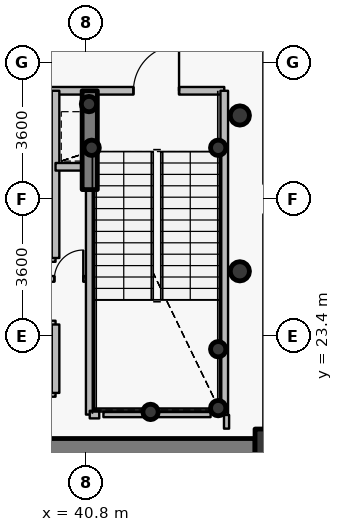
"""IFC4 building model, lengths in metres.
Left out: names, types, materials, properties, quantities, classifications, styles, units other than length and angle.
Written with IfcOpenShell. Run it as: python <this file> out.ifc"""

import sys

from ifc_helpers import new_model, si_unit, direction, frame, frame_2d, origin, origin_2d, place, context, subcontext, project, spatial, rectangle, hollow_circle, extrude, source, transform, mapped, element, fill, save


model = new_model("IFC4")
c1 = context("Model", 3, precision=1e-05, world=origin(), true_north=direction((0.0, 1.0)))
c2 = subcontext(c1, "Body", "Model", "MODEL_VIEW")
j1 = project(units=[si_unit("LENGTHUNIT", "METRE"), si_unit("PLANEANGLEUNIT", "RADIAN")], contexts=[c1])
p1 = place(None, origin())
s1 = spatial("IfcSite", under=j1, at=p1, CompositionType="ELEMENT")
p2 = place(p1, origin())
s2 = spatial("IfcBuilding", under=s1, at=p2, CompositionType="ELEMENT")
p3 = place(p2, frame((0.0, 0.0, 66.0)))
s3 = spatial("IfcBuildingStorey", under=s2, at=p3, CompositionType="ELEMENT", Elevation=66.0)
p4 = place(p3, frame((45.95, 20.25, 0.0), z_axis=(0.0, 0.0, 1.0), x_axis=(1.0, 0.0, 0.0)))
e1 = element("IfcColumn", 1, at=p4, inside=s3, PredefinedType="COLUMN", context=c2, shape_type="SweptSolid", body=[
    extrude(rectangle(XDim=1.4, YDim=1.4, at=origin_2d()), origin(), (0.0, 0.0, 1.0), 4.2),
])
for number, where, z_axis, x_axis in (
    (2, (44.28, 21.5, 0.0), (0.0, 0.0, 1.0), (1.0, 0.0, 0.0)),
    (3, (44.28, 23.05, 0.0), (0.0, 0.0, 1.0), (1.0, 0.0, 0.0)),
    (4, (42.5, 21.4, 0.0), (0.0, 0.0, 1.0), (1.0, 0.0, 0.0)),
    (5, (40.95, 28.35, 0.0), (0.0, 0.0, 1.0), (1.0, 0.0, 0.0)),
    (6, (44.28, 28.35, 0.0), (0.0, 0.0, 1.0), (1.0, 0.0, 0.0)),
    (7, (40.88, 29.5, 0.0), (0.0, 0.0, 1.0), (1.0, 0.0, 0.0)),
):
    element("IfcColumn", number, at=place(p3, frame(where, z_axis=z_axis, x_axis=x_axis)), inside=s3, PredefinedType="COLUMN", context=c2, shape_type="SweptSolid", body=[
        extrude(hollow_circle(Radius=0.203, WallThickness=0.016, at=origin_2d()), origin(), (0.0, 0.0, 1.0), 4.2),
    ])
p5 = place(p3, frame((45.25, 20.25, 0.0), z_axis=(0.0, 0.0, 1.0), x_axis=(-1.0, 0.0, 0.0)))
e8 = element("IfcWall", 8, at=p5, inside=s3, PredefinedType="SHEAR", context=c2, shape_type="SweptSolid", body=[
    extrude(rectangle(XDim=18.5, YDim=0.9, at=frame_2d((9.25, 0.0))), origin(), (0.0, 0.0, 1.0), 3.4),
])
p6 = place(p5, frame((10.0, 0.0, 0.0)))
e9 = element("IfcOpeningElement", 9, at=p6, cuts=e8, PredefinedType="OPENING", context=c2, shape_type="SweptSolid", body=[
    extrude(rectangle(XDim=1.15, YDim=2.15, at=origin_2d()), frame((0.575, 0.46, 1.075), z_axis=(0.0, -1.0, 0.0), x_axis=(1.0, 0.0, 0.0)), (0.0, 0.0, 1.0), 0.92),
])
p7 = place(p3, frame((40.9, 27.25, 0.0), z_axis=(0.0, 0.0, 1.0), x_axis=(0.0, 1.0, 0.0)))
e10 = element("IfcWall", 10, at=p7, inside=s3, PredefinedType="SHEAR", context=c2, shape_type="SweptSolid", body=[
    extrude(rectangle(XDim=2.6, YDim=0.4, at=frame_2d((1.3, 0.0))), origin(), (0.0, 0.0, 1.0), 3.55),
])
for number, where, z_axis, x_axis in (
    (11, (44.85, 25.1, 0.0), (0.0, 0.0, 1.0), (1.0, 0.0, 0.0)),
    (12, (44.85, 29.2, 0.0), (0.0, 0.0, 1.0), (1.0, 0.0, 0.0)),
):
    element("IfcColumn", number, at=place(p3, frame(where, z_axis=z_axis, x_axis=x_axis)), inside=s3, PredefinedType="COLUMN", context=c2, shape_type="SweptSolid", body=[
        extrude(hollow_circle(Radius=0.254, WallThickness=0.02, at=origin_2d()), origin(), (0.0, 0.0, 1.0), 4.2),
    ])
p8 = place(p3, frame((35.05, 27.25, 0.0), z_axis=(0.0, 0.0, 1.0), x_axis=(1.0, 0.0, 0.0)))
e13 = element("IfcWall", 13, at=p8, inside=s3, PredefinedType="PARTITIONING", context=c2, shape_type="SweptSolid", body=[
    extrude(rectangle(XDim=4.95, YDim=0.2, at=frame_2d((2.475, 0.0))), origin(), (0.0, 0.0, 1.0), 3.535),
])
p9 = place(p3, frame((35.45, 23.7, 0.0), z_axis=(0.0, 0.0, 1.0), x_axis=(1.0, 0.0, 0.0)))
e14 = element("IfcWall", 14, at=p9, inside=s3, PredefinedType="PARTITIONING", context=c2, shape_type="SweptSolid", body=[
    extrude(rectangle(XDim=4.55, YDim=0.2, at=frame_2d((2.275, 0.0))), origin(), (0.0, 0.0, 1.0), 3.535),
])
p10 = place(p9, frame((0.25, 0.0, 0.0)))
e15 = element("IfcOpeningElement", 15, at=p10, cuts=e14, PredefinedType="OPENING", context=c2, shape_type="SweptSolid", body=[
    extrude(rectangle(XDim=1.05, YDim=2.15, at=origin_2d()), frame((0.525, 0.11, 1.075), z_axis=(0.0, -1.0, 0.0), x_axis=(1.0, 0.0, 0.0)), (0.0, 0.0, 1.0), 0.22),
])
p11 = place(p9, frame((1.745, 0.0, 0.0)))
e16 = element("IfcOpeningElement", 16, at=p11, cuts=e14, PredefinedType="OPENING", context=c2, shape_type="SweptSolid", body=[
    extrude(rectangle(XDim=1.05, YDim=2.15, at=origin_2d()), frame((0.525, 0.11, 1.075), z_axis=(0.0, -1.0, 0.0), x_axis=(1.0, 0.0, 0.0)), (0.0, 0.0, 1.0), 0.22),
])
p12 = place(p9, frame((3.165, 0.0, 0.0)))
e17 = element("IfcOpeningElement", 17, at=p12, cuts=e14, PredefinedType="OPENING", context=c2, shape_type="SweptSolid", body=[
    extrude(rectangle(XDim=1.05, YDim=2.15, at=origin_2d()), frame((0.525, 0.11, 1.075), z_axis=(0.0, -1.0, 0.0), x_axis=(1.0, 0.0, 0.0)), (0.0, 0.0, 1.0), 0.22),
])
p13 = place(p3, frame((35.45, 25.45, 0.0), z_axis=(0.0, 0.0, 1.0), x_axis=(1.0, 0.0, 0.0)))
e18 = element("IfcWall", 18, at=p13, inside=s3, PredefinedType="PARTITIONING", context=c2, shape_type="SweptSolid", body=[
    extrude(rectangle(XDim=4.55, YDim=0.2, at=frame_2d((2.275, 0.0))), origin(), (0.0, 0.0, 1.0), 3.535),
])
p14 = place(p3, frame((35.95, 29.85, 0.0), z_axis=(0.0, 0.0, 1.0), x_axis=(1.0, 0.0, 0.0)))
e19 = element("IfcWall", 19, at=p14, inside=s3, PredefinedType="PARTITIONING", context=c2, shape_type="SweptSolid", body=[
    extrude(rectangle(XDim=8.49, YDim=0.2, at=frame_2d((4.245, 0.0))), origin(), (0.0, 0.0, 1.0), 3.535),
])
p15 = place(p14, frame((6.1, 0.0, 0.0)))
e20 = element("IfcOpeningElement", 20, at=p15, cuts=e19, PredefinedType="OPENING", context=c2, shape_type="SweptSolid", body=[
    extrude(rectangle(XDim=1.2, YDim=2.15, at=origin_2d()), frame((0.6, 0.11, 1.075), z_axis=(0.0, -1.0, 0.0), x_axis=(1.0, 0.0, 0.0)), (0.0, 0.0, 1.0), 0.22),
])
p16 = place(p14, frame((0.37, 0.0, 0.0)))
e21 = element("IfcOpeningElement", 21, at=p16, cuts=e19, PredefinedType="OPENING", context=c2, shape_type="SweptSolid", body=[
    extrude(rectangle(XDim=1.15, YDim=2.15, at=origin_2d()), frame((0.575, 0.11, 1.075), z_axis=(0.0, -1.0, 0.0), x_axis=(1.0, 0.0, 0.0)), (0.0, 0.0, 1.0), 0.22),
])
p17 = place(p14, frame((2.425, 0.0, 0.0)))
e22 = element("IfcOpeningElement", 22, at=p17, cuts=e19, PredefinedType="OPENING", context=c2, shape_type="SweptSolid", body=[
    extrude(rectangle(XDim=1.05, YDim=2.15, at=origin_2d()), frame((0.525, 0.11, 1.075), z_axis=(0.0, -1.0, 0.0), x_axis=(1.0, 0.0, 0.0)), (0.0, 0.0, 1.0), 0.22),
])
p18 = place(p3, frame((39.8, 21.9, 0.0), z_axis=(0.0, 0.0, 1.0), x_axis=(1.0, 0.0, 0.0)))
e23 = element("IfcWall", 23, at=p18, inside=s3, PredefinedType="PARTITIONING", context=c2, shape_type="SweptSolid", body=[
    extrude(rectangle(XDim=0.2, YDim=0.2, at=frame_2d((0.1, 0.0))), origin(), (0.0, 0.0, 1.0), 3.95),
])
p19 = place(p3, frame((39.8, 24.9, 0.0), z_axis=(0.0, 0.0, 1.0), x_axis=(1.0, 0.0, 0.0)))
e24 = element("IfcWall", 24, at=p19, inside=s3, PredefinedType="PARTITIONING", context=c2, shape_type="SweptSolid", body=[
    extrude(rectangle(XDim=1.1, YDim=0.15, at=frame_2d((0.55, 0.0))), origin(), (0.0, 0.0, 1.0), 3.95),
])
p20 = place(p19, frame((0.17, 0.0, 0.0)))
e25 = element("IfcOpeningElement", 25, at=p20, cuts=e24, PredefinedType="OPENING", context=c2, shape_type="SweptSolid", body=[
    extrude(rectangle(XDim=0.76, YDim=2.1, at=origin_2d()), frame((0.38, 0.085, 1.05), z_axis=(0.0, -1.0, 0.0), x_axis=(1.0, 0.0, 0.0)), (0.0, 0.0, 1.0), 0.17),
])
p21 = place(p3, frame((40.0, 21.9, 0.0), z_axis=(0.0, 0.0, 1.0), x_axis=(0.0, 1.0, 0.0)))
e26 = element("IfcWall", 26, at=p21, inside=s3, PredefinedType="PARTITIONING", context=c2, shape_type="SweptSolid", body=[
    extrude(rectangle(XDim=1.8, YDim=0.2, at=frame_2d((0.9, 0.0))), origin(), (0.0, 0.0, 1.0), 3.95),
])
p22 = place(p3, frame((40.0, 25.45, 0.0), z_axis=(0.0, 0.0, 1.0), x_axis=(0.0, 1.0, 0.0)))
e27 = element("IfcWall", 27, at=p22, inside=s3, PredefinedType="PARTITIONING", context=c2, shape_type="SweptSolid", body=[
    extrude(rectangle(XDim=4.4, YDim=0.2, at=frame_2d((2.2, 0.0))), origin(), (0.0, 0.0, 1.0), 3.95),
])
p23 = place(p3, frame((40.0, 27.85, 0.0), z_axis=(0.0, 0.0, 1.0), x_axis=(1.0, 0.0, 0.0)))
e28 = element("IfcWall", 28, at=p23, inside=s3, PredefinedType="PARTITIONING", context=c2, shape_type="SweptSolid", body=[
    extrude(rectangle(XDim=0.9, YDim=0.2, at=frame_2d((0.45, 0.0))), origin(), (0.0, 0.0, 1.0), 3.95),
])
p24 = place(p3, frame((40.9, 21.33, 0.0), z_axis=(0.0, 0.0, 1.0), x_axis=(0.0, 1.0, 0.0)))
e29 = element("IfcWall", 29, at=p24, inside=s3, PredefinedType="PARTITIONING", context=c2, shape_type="SweptSolid", body=[
    extrude(rectangle(XDim=5.91, YDim=0.2, at=frame_2d((2.955, 0.0))), origin(), (0.0, 0.0, 1.0), 3.485),
])
p25 = place(p3, frame((40.9, 21.33, 0.0), z_axis=(0.0, 0.0, 1.0), x_axis=(1.0, 0.0, 0.0)))
e30 = element("IfcWall", 30, at=p25, inside=s3, PredefinedType="PARTITIONING", context=c2, shape_type="SweptSolid", body=[
    extrude(rectangle(XDim=0.25, YDim=0.2, at=frame_2d((0.125, 0.0))), origin(), (0.0, 0.0, 1.0), 3.485),
])
p26 = place(p3, frame((44.44, 21.33, 0.0), z_axis=(0.0, 0.0, 1.0), x_axis=(0.0, 1.0, 0.0)))
e31 = element("IfcWall", 31, at=p26, inside=s3, PredefinedType="PARTITIONING", context=c2, shape_type="SweptSolid", body=[
    extrude(rectangle(XDim=8.52, YDim=0.2, at=frame_2d((4.26, 0.0))), origin(), (0.0, 0.0, 1.0), 3.95),
])
p27 = place(p3, frame((44.08, 21.33, 0.0), z_axis=(0.0, 0.0, 1.0), x_axis=(-1.0, 0.0, 0.0)))
e32 = element("IfcWall", 32, at=p27, inside=s3, PredefinedType="PARTITIONING", context=c2, shape_type="SweptSolid", body=[
    extrude(rectangle(XDim=2.82, YDim=0.135, at=frame_2d((1.41, 0.0))), origin(), (0.0, 0.0, 1.0), 3.485),
])
p28 = place(p3, frame((44.5, 20.96, 0.0), z_axis=(0.0, 0.0, 1.0), x_axis=(0.0, 1.0, 0.0)))
e33 = element("IfcWall", 33, at=p28, inside=s3, PredefinedType="PARTITIONING", context=c2, shape_type="SweptSolid", body=[
    extrude(rectangle(XDim=0.36, YDim=0.135, at=frame_2d((0.18, 0.0))), origin(), (0.0, 0.0, 1.0), 3.95),
])
m1 = source(origin(), c2, "Body", "SweptSolid", [
    extrude(rectangle(XDim=1.2, YDim=2.15, at=origin_2d()), frame((0.6, 0.025, 1.075), z_axis=(0.0, -1.0, 0.0), x_axis=(1.0, 0.0, 0.0)), (0.0, 0.0, 1.0), 0.05),
])
p29 = place(p15, origin())
e34 = element("IfcDoor", 34, at=p29, inside=s3, OperationType="SINGLE_SWING_RIGHT", PredefinedType="DOOR", context=c2, shape_type="MappedRepresentation", body=[
    mapped(m1, transform((0.0, 0.0, 0.0), x_axis=(1.0, 0.0, 0.0), y_axis=(0.0, 1.0, 0.0), z_axis=(0.0, 0.0, 1.0), scale=1.0)),
])
fill(e20, e34)
m2 = source(origin(), c2, "Body", "SweptSolid", [
    extrude(rectangle(XDim=0.76, YDim=2.1, at=origin_2d()), frame((0.38, 0.025, 1.05), z_axis=(0.0, -1.0, 0.0), x_axis=(1.0, 0.0, 0.0)), (0.0, 0.0, 1.0), 0.05),
])
p30 = place(p20, origin())
e35 = element("IfcDoor", 35, at=p30, inside=s3, OperationType="SINGLE_SWING_RIGHT", PredefinedType="DOOR", context=c2, shape_type="MappedRepresentation", body=[
    mapped(m2, transform((0.0, 0.0, 0.0), x_axis=(1.0, 0.0, 0.0), y_axis=(0.0, 1.0, 0.0), z_axis=(0.0, 0.0, 1.0), scale=1.0)),
])
fill(e25, e35)
save(model, sys.argv[1])
